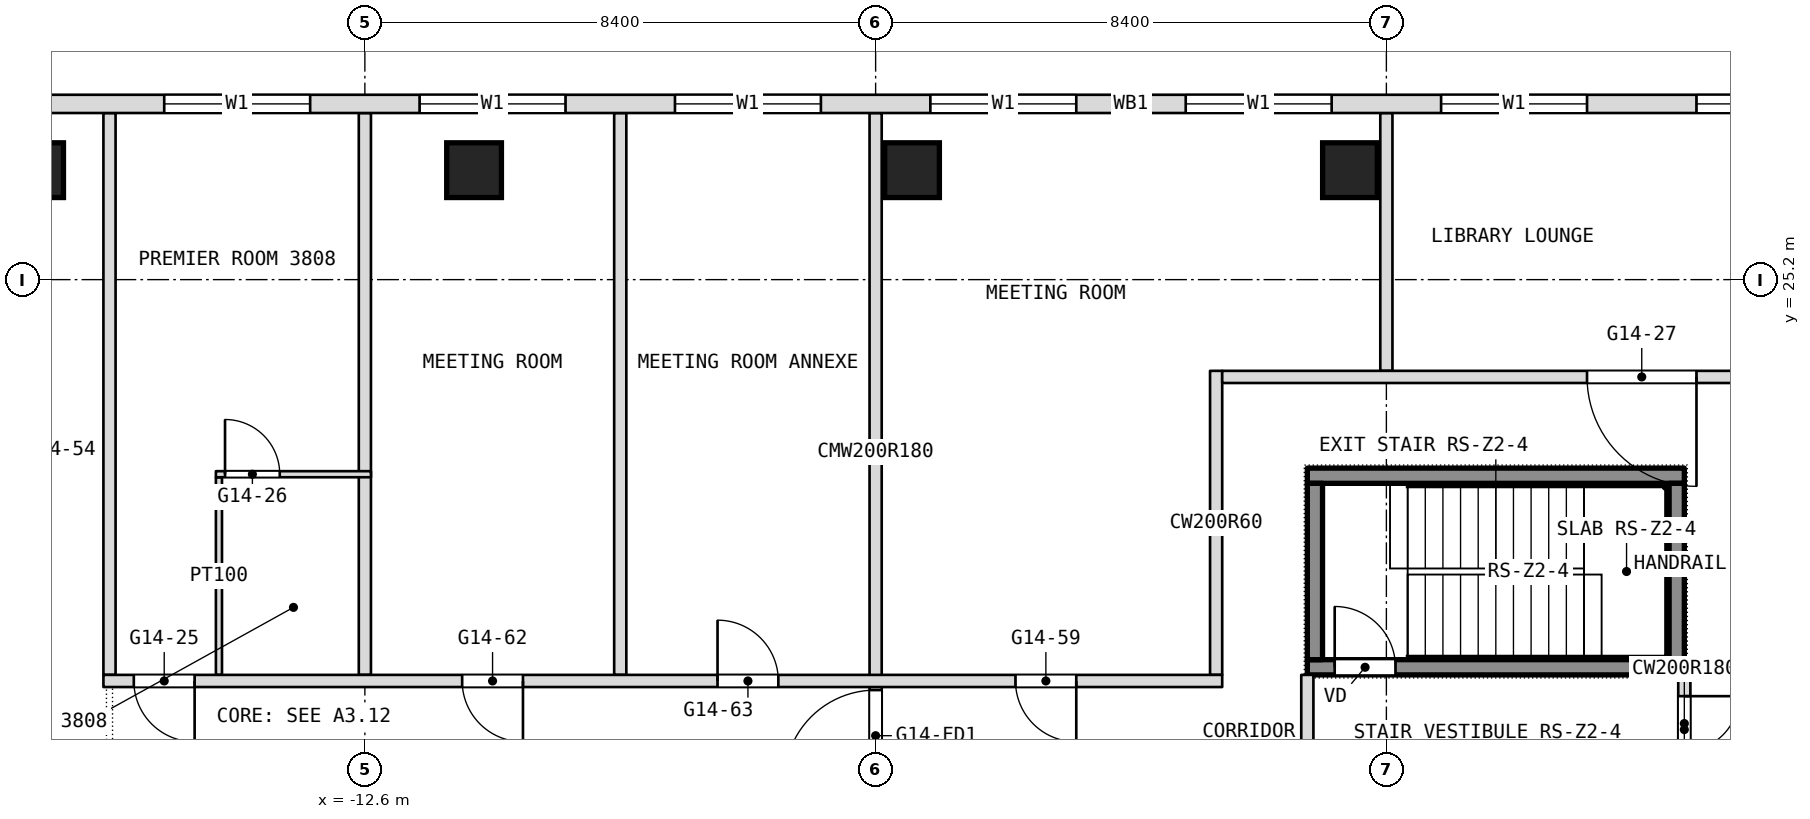
"""IFC4 building model, lengths in metres.
Left out: names, types, materials, properties, quantities, classifications, styles, units other than length and angle.
Written with IfcOpenShell. Run it as: python <this file> out.ifc"""

import sys

from ifc_helpers import new_model, si_unit, direction, frame, frame_2d, origin, origin_2d, place, context, subcontext, project, spatial, rectangle, extrude, element, fill, save


model = new_model("IFC4")
c1 = context("Model", 3, precision=1e-05, world=origin(), true_north=direction((0.0, 1.0)))
c2 = subcontext(c1, "Body", "Model", "MODEL_VIEW")
j1 = project(units=[si_unit("LENGTHUNIT", "METRE"), si_unit("PLANEANGLEUNIT", "RADIAN")], contexts=[c1])
p1 = place(None, origin())
s1 = spatial("IfcSite", under=j1, at=p1, CompositionType="ELEMENT")
p2 = place(p1, origin())
s2 = spatial("IfcBuilding", under=s1, at=p2, CompositionType="ELEMENT")
p3 = place(p2, frame((0.0, 0.0, 162.5)))
s3 = spatial("IfcBuildingStorey", under=s2, at=p3, CompositionType="ELEMENT", Elevation=162.5)
for number, where, z_axis, x_axis in (
    (1, (-18.007, 27.0, 0.0), (0.0, 0.0, 1.0), (1.0, 0.0, 0.0)),
    (2, (-10.804, 27.0, 0.0), (0.0, 0.0, 1.0), (1.0, 0.0, 0.0)),
    (3, (-3.601, 27.0, 0.0), (0.0, 0.0, 1.0), (1.0, 0.0, 0.0)),
    (4, (3.601, 27.0, 0.0), (0.0, 0.0, 1.0), (1.0, 0.0, 0.0)),
):
    element("IfcColumn", number, at=place(p3, frame(where, z_axis=z_axis, x_axis=x_axis)), inside=s3, PredefinedType="COLUMN", context=c2, shape_type="SweptSolid", body=[
        extrude(rectangle(XDim=0.9, YDim=0.9, at=origin_2d()), origin(), (0.0, 0.0, 1.0), 3.6),
    ])
p4 = place(p3, frame((9.1, 16.9, 0.0), z_axis=(0.0, 0.0, 1.0), x_axis=(0.0, 1.0, 0.0)))
e5 = element("IfcWall", 5, at=p4, inside=s3, PredefinedType="PARTITIONING", context=c2, shape_type="SweptSolid", body=[
    extrude(rectangle(XDim=1.8, YDim=0.2, at=frame_2d((0.9, 0.0))), origin(), (0.0, 0.0, 1.0), 3.34),
])
p5 = place(p4, frame((0.55, 0.0, 0.0)))
e6 = element("IfcOpeningElement", 6, at=p5, cuts=e5, PredefinedType="OPENING", context=c2, shape_type="SweptSolid", body=[
    extrude(rectangle(XDim=0.9, YDim=2.1, at=frame_2d((0.45, 1.05))), frame((0.0, 0.1, 0.0), z_axis=(0.0, -1.0, 0.0), x_axis=(1.0, 0.0, 0.0)), (0.0, 0.0, 1.0), 0.2),
])
p6 = place(p3, frame((4.2, 23.7, 0.0), z_axis=(0.0, 0.0, 1.0), x_axis=(0.0, 1.0, 0.0)))
e7 = element("IfcWall", 7, at=p6, inside=s3, PredefinedType="PARTITIONING", context=c2, shape_type="SweptSolid", body=[
    extrude(rectangle(XDim=4.24, YDim=0.2, at=frame_2d((2.12, 0.0))), origin(), (0.0, 0.0, 1.0), 3.34),
])
p7 = place(p3, frame((2.9, 16.9, 0.0), z_axis=(0.0, 0.0, 1.0), x_axis=(0.0, 1.0, 0.0)))
e8 = element("IfcWall", 8, at=p7, inside=s3, PredefinedType="PARTITIONING", context=c2, shape_type="SweptSolid", body=[
    extrude(rectangle(XDim=1.8, YDim=0.2, at=frame_2d((0.9, 0.0))), origin(), (0.0, 0.0, 1.0), 3.34),
])
p8 = place(p3, frame((1.4, 18.7, 0.0), z_axis=(0.0, 0.0, 1.0), x_axis=(0.0, 1.0, 0.0)))
e9 = element("IfcWall", 9, at=p8, inside=s3, PredefinedType="PARTITIONING", context=c2, shape_type="SweptSolid", body=[
    extrude(rectangle(XDim=5.0, YDim=0.2, at=frame_2d((2.5, 0.0))), origin(), (0.0, 0.0, 1.0), 3.34),
])
p9 = place(p3, frame((-4.2, 16.8, 0.0), z_axis=(0.0, 0.0, 1.0), x_axis=(0.0, 1.0, 0.0)))
e10 = element("IfcWall", 10, at=p9, inside=s3, PredefinedType="PARTITIONING", context=c2, shape_type="SweptSolid", body=[
    extrude(rectangle(XDim=11.14, YDim=0.2, at=frame_2d((5.57, 0.0))), origin(), (0.0, 0.0, 1.0), 3.34),
])
p10 = place(p9, frame((0.15, 0.0, 0.0)))
e11 = element("IfcOpeningElement", 11, at=p10, cuts=e10, PredefinedType="OPENING", context=c2, shape_type="SweptSolid", body=[
    extrude(rectangle(XDim=1.5, YDim=2.1, at=frame_2d((0.75, 1.05))), frame((0.0, 0.1, 0.0), z_axis=(0.0, -1.0, 0.0), x_axis=(1.0, 0.0, 0.0)), (0.0, 0.0, 1.0), 0.2),
])
for number, where, z_axis, x_axis in (
    (12, (-8.4, 18.7, 0.0), (0.0, 0.0, 1.0), (0.0, 1.0, 0.0)),
    (13, (-12.6, 18.7, 0.0), (0.0, 0.0, 1.0), (0.0, 1.0, 0.0)),
):
    element("IfcWall", number, at=place(p3, frame(where, z_axis=z_axis, x_axis=x_axis)), inside=s3, PredefinedType="PARTITIONING", context=c2, shape_type="SweptSolid", body=[
        extrude(rectangle(XDim=9.24, YDim=0.2, at=frame_2d((4.62, 0.0))), origin(), (0.0, 0.0, 1.0), 3.34),
    ])
p11 = place(p3, frame((-15.0, 18.7, 0.0), z_axis=(0.0, 0.0, 1.0), x_axis=(0.0, 1.0, 0.0)))
e14 = element("IfcWall", 14, at=p11, inside=s3, PredefinedType="PARTITIONING", context=c2, shape_type="SweptSolid", body=[
    extrude(rectangle(XDim=3.25, YDim=0.1, at=frame_2d((1.625, 0.0))), origin(), (0.0, 0.0, 1.0), 3.34),
])
p12 = place(p3, frame((-16.8, 18.7, 0.0), z_axis=(0.0, 0.0, 1.0), x_axis=(0.0, 1.0, 0.0)))
e15 = element("IfcWall", 15, at=p12, inside=s3, PredefinedType="PARTITIONING", context=c2, shape_type="SweptSolid", body=[
    extrude(rectangle(XDim=9.24, YDim=0.2, at=frame_2d((4.62, 0.0))), origin(), (0.0, 0.0, 1.0), 3.34),
])
p13 = place(p3, frame((-16.9, 18.6, 0.0), z_axis=(0.0, 0.0, 1.0), x_axis=(1.0, 0.0, 0.0)))
e16 = element("IfcWall", 16, at=p13, inside=s3, PredefinedType="PARTITIONING", context=c2, shape_type="SweptSolid", body=[
    extrude(rectangle(XDim=18.4, YDim=0.2, at=frame_2d((9.2, 0.0))), origin(), (0.0, 0.0, 1.0), 3.34),
])
p14 = place(p13, frame((0.5, 0.0, 0.0)))
e17 = element("IfcOpeningElement", 17, at=p14, cuts=e16, PredefinedType="OPENING", context=c2, shape_type="SweptSolid", body=[
    extrude(rectangle(XDim=1.0, YDim=2.1, at=frame_2d((0.5, 1.05))), frame((0.0, 0.1, 0.0), z_axis=(0.0, -1.0, 0.0), x_axis=(1.0, 0.0, 0.0)), (0.0, 0.0, 1.0), 0.2),
])
p15 = place(p13, frame((15.0, 0.0, 0.0)))
e18 = element("IfcOpeningElement", 18, at=p15, cuts=e16, PredefinedType="OPENING", context=c2, shape_type="SweptSolid", body=[
    extrude(rectangle(XDim=1.0, YDim=2.1, at=frame_2d((0.5, 1.05))), frame((0.0, 0.1, 0.0), z_axis=(0.0, -1.0, 0.0), x_axis=(1.0, 0.0, 0.0)), (0.0, 0.0, 1.0), 0.2),
])
p16 = place(p13, frame((5.9, 0.0, 0.0)))
e19 = element("IfcOpeningElement", 19, at=p16, cuts=e16, PredefinedType="OPENING", context=c2, shape_type="SweptSolid", body=[
    extrude(rectangle(XDim=1.0, YDim=2.1, at=frame_2d((0.5, 1.05))), frame((0.0, 0.1, 0.0), z_axis=(0.0, -1.0, 0.0), x_axis=(1.0, 0.0, 0.0)), (0.0, 0.0, 1.0), 0.2),
])
p17 = place(p13, frame((10.1, 0.0, 0.0)))
e20 = element("IfcOpeningElement", 20, at=p17, cuts=e16, PredefinedType="OPENING", context=c2, shape_type="SweptSolid", body=[
    extrude(rectangle(XDim=1.0, YDim=2.1, at=frame_2d((0.5, 1.05))), frame((0.0, 0.1, 0.0), z_axis=(0.0, -1.0, 0.0), x_axis=(1.0, 0.0, 0.0)), (0.0, 0.0, 1.0), 0.2),
])
p18 = place(p3, frame((-15.05, 22.0, 0.0), z_axis=(0.0, 0.0, 1.0), x_axis=(1.0, 0.0, 0.0)))
e21 = element("IfcWall", 21, at=p18, inside=s3, PredefinedType="PARTITIONING", context=c2, shape_type="SweptSolid", body=[
    extrude(rectangle(XDim=2.55, YDim=0.1, at=frame_2d((1.275, 0.0))), origin(), (0.0, 0.0, 1.0), 3.34),
])
p19 = place(p18, frame((0.15, 0.0, 0.0)))
e22 = element("IfcOpeningElement", 22, at=p19, cuts=e21, PredefinedType="OPENING", context=c2, shape_type="SweptSolid", body=[
    extrude(rectangle(XDim=0.9, YDim=2.1, at=frame_2d((0.45, 1.05))), frame((0.0, 0.05, 0.0), z_axis=(0.0, -1.0, 0.0), x_axis=(1.0, 0.0, 0.0)), (0.0, 0.0, 1.0), 0.1),
])
p20 = place(p3, frame((1.5, 23.6, 0.0), z_axis=(0.0, 0.0, 1.0), x_axis=(1.0, 0.0, 0.0)))
e23 = element("IfcWall", 23, at=p20, inside=s3, PredefinedType="PARTITIONING", context=c2, shape_type="SweptSolid", body=[
    extrude(rectangle(XDim=9.2, YDim=0.2, at=frame_2d((4.6, 0.0))), origin(), (0.0, 0.0, 1.0), 3.34),
])
p21 = place(p20, frame((6.0, 0.0, 0.0)))
e24 = element("IfcOpeningElement", 24, at=p21, cuts=e23, PredefinedType="OPENING", context=c2, shape_type="SweptSolid", body=[
    extrude(rectangle(XDim=1.8, YDim=2.1, at=frame_2d((0.9, 1.05))), frame((0.0, 0.1, 0.0), z_axis=(0.0, -1.0, 0.0), x_axis=(1.0, 0.0, 0.0)), (0.0, 0.0, 1.0), 0.2),
])
p22 = place(p3, frame((21.306, 28.09, 0.0), z_axis=(0.0, 0.0, 1.0), x_axis=(-1.0, 0.0, 0.0)))
e25 = element("IfcWall", 25, at=p22, inside=s3, PredefinedType="NOTDEFINED", context=c2, shape_type="SweptSolid", body=[
    extrude(rectangle(XDim=42.612, YDim=0.3, at=frame_2d((21.306, 0.0))), origin(), (0.0, 0.0, 1.0), 3.6),
])
p23 = place(p22, frame((5.406, 0.0, 0.9)))
e26 = element("IfcOpeningElement", 26, at=p23, cuts=e25, PredefinedType="OPENING", context=c2, shape_type="SweptSolid", body=[
    extrude(rectangle(XDim=2.4, YDim=2.1, at=frame_2d((1.2, 1.05))), frame((0.0, 0.15, 0.0), z_axis=(0.0, -1.0, 0.0), x_axis=(1.0, 0.0, 0.0)), (0.0, 0.0, 1.0), 0.3),
])
p24 = place(p22, frame((9.606, 0.0, 0.9)))
e27 = element("IfcOpeningElement", 27, at=p24, cuts=e25, PredefinedType="OPENING", context=c2, shape_type="SweptSolid", body=[
    extrude(rectangle(XDim=2.4, YDim=2.1, at=frame_2d((1.2, 1.05))), frame((0.0, 0.15, 0.0), z_axis=(0.0, -1.0, 0.0), x_axis=(1.0, 0.0, 0.0)), (0.0, 0.0, 1.0), 0.3),
])
p25 = place(p22, frame((13.806, 0.0, 0.9)))
e28 = element("IfcOpeningElement", 28, at=p25, cuts=e25, PredefinedType="OPENING", context=c2, shape_type="SweptSolid", body=[
    extrude(rectangle(XDim=2.4, YDim=2.1, at=frame_2d((1.2, 1.05))), frame((0.0, 0.15, 0.0), z_axis=(0.0, -1.0, 0.0), x_axis=(1.0, 0.0, 0.0)), (0.0, 0.0, 1.0), 0.3),
])
p26 = place(p22, frame((18.006, 0.0, 0.9)))
e29 = element("IfcOpeningElement", 29, at=p26, cuts=e25, PredefinedType="OPENING", context=c2, shape_type="SweptSolid", body=[
    extrude(rectangle(XDim=2.4, YDim=2.1, at=frame_2d((1.2, 1.05))), frame((0.0, 0.15, 0.0), z_axis=(0.0, -1.0, 0.0), x_axis=(1.0, 0.0, 0.0)), (0.0, 0.0, 1.0), 0.3),
])
p27 = place(p22, frame((22.206, 0.0, 0.9)))
e30 = element("IfcOpeningElement", 30, at=p27, cuts=e25, PredefinedType="OPENING", context=c2, shape_type="SweptSolid", body=[
    extrude(rectangle(XDim=2.4, YDim=2.1, at=frame_2d((1.2, 1.05))), frame((0.0, 0.15, 0.0), z_axis=(0.0, -1.0, 0.0), x_axis=(1.0, 0.0, 0.0)), (0.0, 0.0, 1.0), 0.3),
])
p28 = place(p22, frame((26.406, 0.0, 0.9)))
e31 = element("IfcOpeningElement", 31, at=p28, cuts=e25, PredefinedType="OPENING", context=c2, shape_type="SweptSolid", body=[
    extrude(rectangle(XDim=2.4, YDim=2.1, at=frame_2d((1.2, 1.05))), frame((0.0, 0.15, 0.0), z_axis=(0.0, -1.0, 0.0), x_axis=(1.0, 0.0, 0.0)), (0.0, 0.0, 1.0), 0.3),
])
p29 = place(p22, frame((30.606, 0.0, 0.9)))
e32 = element("IfcOpeningElement", 32, at=p29, cuts=e25, PredefinedType="OPENING", context=c2, shape_type="SweptSolid", body=[
    extrude(rectangle(XDim=2.4, YDim=2.1, at=frame_2d((1.2, 1.05))), frame((0.0, 0.15, 0.0), z_axis=(0.0, -1.0, 0.0), x_axis=(1.0, 0.0, 0.0)), (0.0, 0.0, 1.0), 0.3),
])
p30 = place(p22, frame((34.806, 0.0, 0.9)))
e33 = element("IfcOpeningElement", 33, at=p30, cuts=e25, PredefinedType="OPENING", context=c2, shape_type="SweptSolid", body=[
    extrude(rectangle(XDim=2.4, YDim=2.1, at=frame_2d((1.2, 1.05))), frame((0.0, 0.15, 0.0), z_axis=(0.0, -1.0, 0.0), x_axis=(1.0, 0.0, 0.0)), (0.0, 0.0, 1.0), 0.3),
])
p31 = place(p3, frame((2.9, 18.825, 0.1), z_axis=(0.0, 0.0, 1.0), x_axis=(1.0, 0.0, 0.0)))
e34 = element("IfcWall", 34, at=p31, inside=s3, PredefinedType="SHEAR", context=c2, shape_type="SweptSolid", body=[
    extrude(rectangle(XDim=6.2, YDim=0.25, at=frame_2d((3.1, 0.0))), origin(), (0.0, 0.0, 1.0), 3.6),
])
p32 = place(p31, frame((0.45, 0.0, 0.0)))
e35 = element("IfcOpeningElement", 35, at=p32, cuts=e34, PredefinedType="OPENING", context=c2, shape_type="SweptSolid", body=[
    extrude(rectangle(XDim=1.0, YDim=2.1, at=frame_2d((0.5, 1.05))), frame((0.0, 0.125, 0.0), z_axis=(0.0, -1.0, 0.0), x_axis=(1.0, 0.0, 0.0)), (0.0, 0.0, 1.0), 0.25),
])
p33 = place(p3, frame((2.9, 21.975, 0.1), z_axis=(0.0, 0.0, 1.0), x_axis=(1.0, 0.0, 0.0)))
e36 = element("IfcWall", 36, at=p33, inside=s3, PredefinedType="SHEAR", context=c2, shape_type="SweptSolid", body=[
    extrude(rectangle(XDim=6.2, YDim=0.25, at=frame_2d((3.1, 0.0))), origin(), (0.0, 0.0, 1.0), 3.6),
])
for number, where, z_axis, x_axis in (
    (37, (3.025, 18.95, 0.1), (0.0, 0.0, 1.0), (0.0, 1.0, 0.0)),
    (38, (8.975, 18.95, 0.1), (0.0, 0.0, 1.0), (0.0, 1.0, 0.0)),
):
    element("IfcWall", number, at=place(p3, frame(where, z_axis=z_axis, x_axis=x_axis)), inside=s3, PredefinedType="SHEAR", context=c2, shape_type="SweptSolid", body=[
        extrude(rectangle(XDim=2.9, YDim=0.25, at=frame_2d((1.45, 0.0))), origin(), (0.0, 0.0, 1.0), 3.6),
    ])
p34 = place(p5, origin())
e39 = element("IfcDoor", 39, at=p34, inside=s3, OperationType="SINGLE_SWING_RIGHT", PredefinedType="DOOR", context=c2, shape_type="SweptSolid", body=[
    extrude(rectangle(XDim=0.9, YDim=2.1, at=frame_2d((0.45, 1.05))), frame((0.0, 0.025, 0.0), z_axis=(0.0, -1.0, 0.0), x_axis=(1.0, 0.0, 0.0)), (0.0, 0.0, 1.0), 0.05),
])
fill(e6, e39)
p35 = place(p14, origin())
e40 = element("IfcDoor", 40, at=p35, inside=s3, OperationType="SINGLE_SWING_RIGHT", PredefinedType="DOOR", context=c2, shape_type="SweptSolid", body=[
    extrude(rectangle(XDim=1.0, YDim=2.1, at=frame_2d((0.5, 1.05))), frame((0.0, 0.025, 0.0), z_axis=(0.0, -1.0, 0.0), x_axis=(1.0, 0.0, 0.0)), (0.0, 0.0, 1.0), 0.05),
])
fill(e17, e40)
p36 = place(p15, origin())
e41 = element("IfcDoor", 41, at=p36, inside=s3, OperationType="SINGLE_SWING_RIGHT", PredefinedType="DOOR", context=c2, shape_type="SweptSolid", body=[
    extrude(rectangle(XDim=1.0, YDim=2.1, at=frame_2d((0.5, 1.05))), frame((0.0, 0.025, 0.0), z_axis=(0.0, -1.0, 0.0), x_axis=(1.0, 0.0, 0.0)), (0.0, 0.0, 1.0), 0.05),
])
fill(e18, e41)
p37 = place(p16, origin())
e42 = element("IfcDoor", 42, at=p37, inside=s3, OperationType="SINGLE_SWING_LEFT", PredefinedType="DOOR", context=c2, shape_type="SweptSolid", body=[
    extrude(rectangle(XDim=1.0, YDim=2.1, at=frame_2d((0.5, 1.05))), frame((0.0, 0.025, 0.0), z_axis=(0.0, -1.0, 0.0), x_axis=(1.0, 0.0, 0.0)), (0.0, 0.0, 1.0), 0.05),
])
fill(e19, e42)
p38 = place(p17, origin())
e43 = element("IfcDoor", 43, at=p38, inside=s3, OperationType="SINGLE_SWING_RIGHT", PredefinedType="DOOR", context=c2, shape_type="SweptSolid", body=[
    extrude(rectangle(XDim=1.0, YDim=2.1, at=frame_2d((0.5, 1.05))), frame((0.0, 0.025, 0.0), z_axis=(0.0, -1.0, 0.0), x_axis=(1.0, 0.0, 0.0)), (0.0, 0.0, 1.0), 0.05),
])
fill(e20, e43)
p39 = place(p19, origin())
e44 = element("IfcDoor", 44, at=p39, inside=s3, OperationType="SINGLE_SWING_RIGHT", PredefinedType="DOOR", context=c2, shape_type="SweptSolid", body=[
    extrude(rectangle(XDim=0.9, YDim=2.1, at=frame_2d((0.45, 1.05))), frame((0.0, 0.025, 0.0), z_axis=(0.0, -1.0, 0.0), x_axis=(1.0, 0.0, 0.0)), (0.0, 0.0, 1.0), 0.05),
])
fill(e22, e44)
p40 = place(p21, origin())
e45 = element("IfcDoor", 45, at=p40, inside=s3, OperationType="DOUBLE_DOOR_SINGLE_SWING", PredefinedType="DOOR", context=c2, shape_type="SweptSolid", body=[
    extrude(rectangle(XDim=1.8, YDim=2.1, at=frame_2d((0.9, 1.05))), frame((0.0, 0.025, 0.0), z_axis=(0.0, -1.0, 0.0), x_axis=(1.0, 0.0, 0.0)), (0.0, 0.0, 1.0), 0.05),
])
fill(e24, e45)
p41 = place(p24, origin())
e46 = element("IfcWindow", 46, at=p41, inside=s3, PartitioningType="SINGLE_PANEL", PredefinedType="WINDOW", context=c2, shape_type="SweptSolid", body=[
    extrude(rectangle(XDim=2.4, YDim=2.1, at=frame_2d((1.2, 1.05))), frame((0.0, 0.03, 0.0), z_axis=(0.0, -1.0, 0.0), x_axis=(1.0, 0.0, 0.0)), (0.0, 0.0, 1.0), 0.06),
])
fill(e27, e46)
p42 = place(p25, origin())
e47 = element("IfcWindow", 47, at=p42, inside=s3, PartitioningType="SINGLE_PANEL", PredefinedType="WINDOW", context=c2, shape_type="SweptSolid", body=[
    extrude(rectangle(XDim=2.4, YDim=2.1, at=frame_2d((1.2, 1.05))), frame((0.0, 0.03, 0.0), z_axis=(0.0, -1.0, 0.0), x_axis=(1.0, 0.0, 0.0)), (0.0, 0.0, 1.0), 0.06),
])
fill(e28, e47)
p43 = place(p26, origin())
e48 = element("IfcWindow", 48, at=p43, inside=s3, PartitioningType="SINGLE_PANEL", PredefinedType="WINDOW", context=c2, shape_type="SweptSolid", body=[
    extrude(rectangle(XDim=2.4, YDim=2.1, at=frame_2d((1.2, 1.05))), frame((0.0, 0.03, 0.0), z_axis=(0.0, -1.0, 0.0), x_axis=(1.0, 0.0, 0.0)), (0.0, 0.0, 1.0), 0.06),
])
fill(e29, e48)
p44 = place(p27, origin())
e49 = element("IfcWindow", 49, at=p44, inside=s3, PartitioningType="SINGLE_PANEL", PredefinedType="WINDOW", context=c2, shape_type="SweptSolid", body=[
    extrude(rectangle(XDim=2.4, YDim=2.1, at=frame_2d((1.2, 1.05))), frame((0.0, 0.03, 0.0), z_axis=(0.0, -1.0, 0.0), x_axis=(1.0, 0.0, 0.0)), (0.0, 0.0, 1.0), 0.06),
])
fill(e30, e49)
p45 = place(p28, origin())
e50 = element("IfcWindow", 50, at=p45, inside=s3, PartitioningType="SINGLE_PANEL", PredefinedType="WINDOW", context=c2, shape_type="SweptSolid", body=[
    extrude(rectangle(XDim=2.4, YDim=2.1, at=frame_2d((1.2, 1.05))), frame((0.0, 0.03, 0.0), z_axis=(0.0, -1.0, 0.0), x_axis=(1.0, 0.0, 0.0)), (0.0, 0.0, 1.0), 0.06),
])
fill(e31, e50)
p46 = place(p29, origin())
e51 = element("IfcWindow", 51, at=p46, inside=s3, PartitioningType="SINGLE_PANEL", PredefinedType="WINDOW", context=c2, shape_type="SweptSolid", body=[
    extrude(rectangle(XDim=2.4, YDim=2.1, at=frame_2d((1.2, 1.05))), frame((0.0, 0.03, 0.0), z_axis=(0.0, -1.0, 0.0), x_axis=(1.0, 0.0, 0.0)), (0.0, 0.0, 1.0), 0.06),
])
fill(e32, e51)
p47 = place(p30, origin())
e52 = element("IfcWindow", 52, at=p47, inside=s3, PartitioningType="SINGLE_PANEL", PredefinedType="WINDOW", context=c2, shape_type="SweptSolid", body=[
    extrude(rectangle(XDim=2.4, YDim=2.1, at=frame_2d((1.2, 1.05))), frame((0.0, 0.03, 0.0), z_axis=(0.0, -1.0, 0.0), x_axis=(1.0, 0.0, 0.0)), (0.0, 0.0, 1.0), 0.06),
])
fill(e33, e52)
p48 = place(p32, origin())
e53 = element("IfcDoor", 53, at=p48, inside=s3, OperationType="SINGLE_SWING_LEFT", PredefinedType="DOOR", context=c2, shape_type="SweptSolid", body=[
    extrude(rectangle(XDim=1.0, YDim=2.1, at=frame_2d((0.5, 1.05))), frame((0.0, 0.025, 0.0), z_axis=(0.0, -1.0, 0.0), x_axis=(1.0, 0.0, 0.0)), (0.0, 0.0, 1.0), 0.05),
])
fill(e35, e53)
p49 = place(p10, origin())
e54 = element("IfcDoor", 54, at=p49, inside=s3, OperationType="DOUBLE_DOOR_DOUBLE_SWING", PredefinedType="DOOR", context=c2, shape_type="SweptSolid", body=[
    extrude(rectangle(XDim=1.5, YDim=2.1, at=frame_2d((0.75, 1.05))), frame((0.0, 0.025, 0.0), z_axis=(0.0, -1.0, 0.0), x_axis=(1.0, 0.0, 0.0)), (0.0, 0.0, 1.0), 0.05),
])
fill(e11, e54)
save(model, sys.argv[1])
